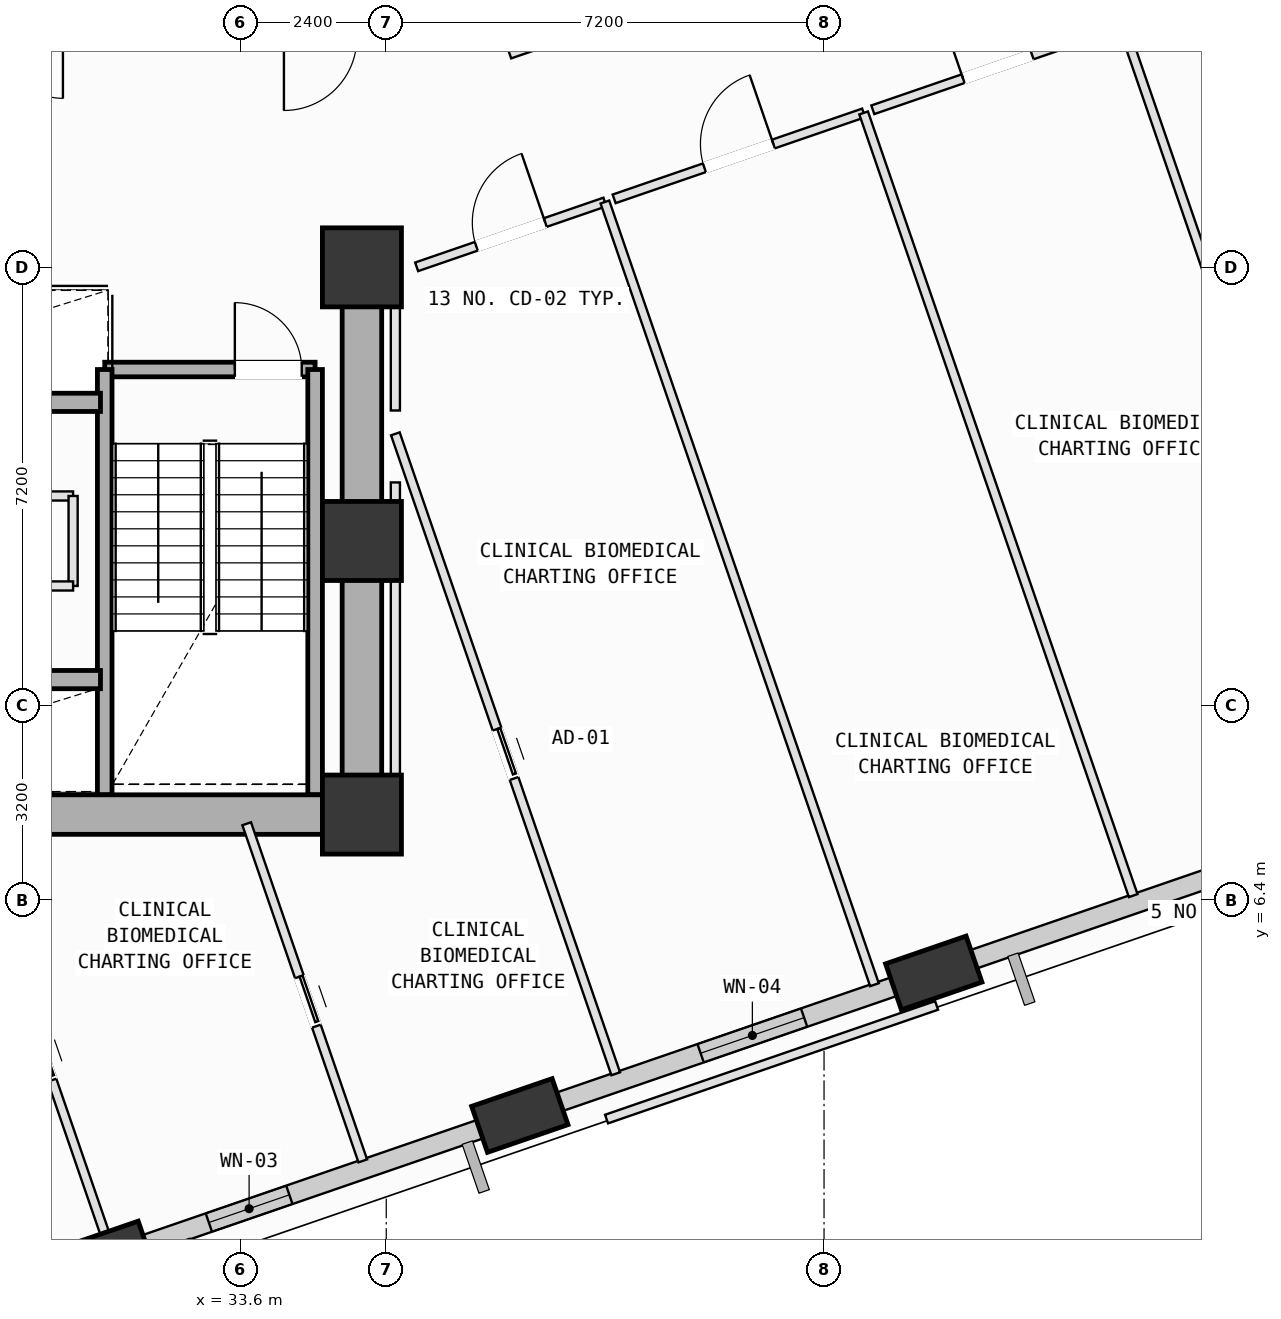
"""IFC4 building model, lengths in metres.
Left out: names, types, materials, properties, quantities, classifications, styles, units other than length and angle.
Written with IfcOpenShell. Run it as: python <this file> out.ifc"""

import sys

from ifc_helpers import new_model, si_unit, direction, frame, frame_2d, origin, origin_2d, place, context, subcontext, project, spatial, rectangle, extrude, element, fill, save


model = new_model("IFC4")
c1 = context("Model", 3, precision=1e-05, world=origin(), true_north=direction((0.0, 1.0)))
c2 = subcontext(c1, "Body", "Model", "MODEL_VIEW")
j1 = project(units=[si_unit("LENGTHUNIT", "METRE"), si_unit("PLANEANGLEUNIT", "RADIAN")], contexts=[c1])
p1 = place(None, origin())
s1 = spatial("IfcSite", under=j1, at=p1, CompositionType="ELEMENT")
p2 = place(p1, origin())
s2 = spatial("IfcBuilding", under=s1, at=p2, CompositionType="ELEMENT")
p3 = place(p2, frame((0.0, 0.0, 104.4)))
s3 = spatial("IfcBuildingStorey", under=s2, at=p3, CompositionType="ELEMENT", Elevation=104.4)
for number, where, z_axis, x_axis in (
    (1, (35.6, 7.8, 0.0), (0.0, 0.0, 1.0), (1.0, 0.0, 0.0)),
    (2, (35.6, 12.3, 0.0), (0.0, 0.0, 1.0), (1.0, 0.0, 0.0)),
    (3, (35.6, 16.8, 0.0), (0.0, 0.0, 1.0), (1.0, 0.0, 0.0)),
):
    element("IfcColumn", number, at=place(p3, frame(where, z_axis=z_axis, x_axis=x_axis)), inside=s3, PredefinedType="COLUMN", context=c2, shape_type="SweptSolid", body=[
        extrude(rectangle(XDim=1.3, YDim=1.3, at=origin_2d()), origin(), (0.0, 0.0, 1.0), 4.0),
    ])
p4 = place(p3, frame((31.389, 0.507, 0.002), z_axis=(0.100228414923, -0.008327042356, 0.994929608167), x_axis=(-0.244520655931, 0.969091071717, 0.032743603058)))
e4 = element("IfcColumn", 4, at=p4, inside=s3, PredefinedType="COLUMN", context=c2, shape_type="SweptSolid", body=[
    extrude(rectangle(XDim=1.4, YDim=0.8, at=origin_2d()), origin(), (0.0, 0.0, 1.0), 4.017),
])
p5 = place(p3, frame((38.197, 2.851, 0.002), z_axis=(0.090452237625, 0.019769318916, 0.995704557958), x_axis=(-0.518581513534, 0.854496683427, 0.030143520588)))
e5 = element("IfcColumn", 5, at=p5, inside=s3, PredefinedType="COLUMN", context=c2, shape_type="SweptSolid", body=[
    extrude(rectangle(XDim=1.4, YDim=0.8, at=origin_2d()), origin(), (0.0, 0.0, 1.0), 4.014),
])
p6 = place(p3, frame((45.004, 5.195, 0.002), z_axis=(0.080468927595, 0.047746113501, 0.995612906876), x_axis=(-0.761244761344, 0.647748745113, 0.030462707212)))
e6 = element("IfcColumn", 6, at=p6, inside=s3, PredefinedType="COLUMN", context=c2, shape_type="SweptSolid", body=[
    extrude(rectangle(XDim=1.4, YDim=0.8, at=origin_2d()), origin(), (0.0, 0.0, 1.0), 4.014),
])
p7 = place(p3, frame((37.902, 2.749, 0.0), z_axis=(0.0, 0.0, 1.0), x_axis=(-0.945529854609, -0.32553539599, 0.0)))
e7 = element("IfcWall", 7, at=p7, inside=s3, PredefinedType="SOLIDWALL", context=c2, shape_type="SweptSolid", body=[
    extrude(rectangle(XDim=6.214, YDim=0.32, at=frame_2d((3.107, 0.0))), origin(), (0.0, 0.0, 1.0), 3.165),
])
p8 = place(p7, frame((3.698, 0.0, 0.75)))
e8 = element("IfcOpeningElement", 8, at=p8, cuts=e7, PredefinedType="OPENING", context=c2, shape_type="SweptSolid", body=[
    extrude(rectangle(XDim=1.4, YDim=1.85, at=frame_2d((0.7, 0.925))), frame((0.0, 0.17, 0.0), z_axis=(0.0, -1.0, 0.0), x_axis=(1.0, 0.0, 0.0)), (0.0, 0.0, 1.0), 0.34),
])
p9 = place(p3, frame((44.71, 5.094, 0.0), z_axis=(0.0, 0.0, 1.0), x_axis=(-0.945514965925, -0.325578637522, 0.0)))
e9 = element("IfcWall", 9, at=p9, inside=s3, PredefinedType="SOLIDWALL", context=c2, shape_type="SweptSolid", body=[
    extrude(rectangle(XDim=6.209, YDim=0.32, at=frame_2d((3.104, 0.0))), origin(), (0.0, 0.0, 1.0), 3.165),
])
p10 = place(p9, frame((1.944, 0.0, 0.75)))
e10 = element("IfcOpeningElement", 10, at=p10, cuts=e9, PredefinedType="OPENING", context=c2, shape_type="SweptSolid", body=[
    extrude(rectangle(XDim=1.8, YDim=2.05, at=frame_2d((0.9, 1.025))), frame((0.0, 0.17, 0.0), z_axis=(0.0, -1.0, 0.0), x_axis=(1.0, 0.0, 0.0)), (0.0, 0.0, 1.0), 0.34),
])
p11 = place(p3, frame((51.525, 7.44, 0.0), z_axis=(0.0, 0.0, 1.0), x_axis=(-0.945519755004, -0.325564729196, 0.0)))
e11 = element("IfcWall", 11, at=p11, inside=s3, PredefinedType="SOLIDWALL", context=c2, shape_type="SweptSolid", body=[
    extrude(rectangle(XDim=6.218, YDim=0.32, at=frame_2d((3.109, 0.0))), origin(), (0.0, 0.0, 1.0), 3.165),
])
p12 = place(p11, frame((0.908, 0.0, 0.75)))
e12 = element("IfcOpeningElement", 12, at=p12, cuts=e11, PredefinedType="OPENING", context=c2, shape_type="SweptSolid", body=[
    extrude(rectangle(XDim=1.2, YDim=1.75, at=frame_2d((0.6, 0.875))), frame((0.0, 0.17, 0.0), z_axis=(0.0, -1.0, 0.0), x_axis=(1.0, 0.0, 0.0)), (0.0, 0.0, 1.0), 0.34),
])
p13 = place(p3, frame((31.37, 15.12, 0.0), z_axis=(0.0, 0.0, 1.0), x_axis=(1.0, 0.0, 0.0)))
e13 = element("IfcWall", 13, at=p13, inside=s3, PredefinedType="SOLIDWALL", context=c2, shape_type="SweptSolid", body=[
    extrude(rectangle(XDim=3.46, YDim=0.24, at=frame_2d((1.73, 0.0))), origin(), (0.0, 0.0, 1.0), 3.78),
])
p14 = place(p13, frame((2.14, 0.0, 0.0)))
e14 = element("IfcOpeningElement", 14, at=p14, cuts=e13, PredefinedType="OPENING", context=c2, shape_type="SweptSolid", body=[
    extrude(rectangle(XDim=1.1, YDim=2.15, at=frame_2d((0.55, 1.075))), frame((0.0, 0.13, 0.0), z_axis=(0.0, -1.0, 0.0), x_axis=(1.0, 0.0, 0.0)), (0.0, 0.0, 1.0), 0.26),
])
for number, where, z_axis, x_axis in (
    (15, (34.83, 15.12, 0.0), (0.0, 0.0, 1.0), (0.0, -1.0, 0.0)),
    (16, (31.37, 8.125, 0.0), (0.0, 0.0, 1.0), (0.0, 1.0, 0.0)),
):
    element("IfcWall", number, at=place(p3, frame(where, z_axis=z_axis, x_axis=x_axis)), inside=s3, PredefinedType="SOLIDWALL", context=c2, shape_type="SweptSolid", body=[
        extrude(rectangle(XDim=6.995, YDim=0.24, at=frame_2d((3.498, 0.0))), origin(), (0.0, 0.0, 1.0), 3.78),
    ])
p15 = place(p3, frame((24.8, 7.8, 0.0), z_axis=(0.0, 0.0, 1.0), x_axis=(1.0, 0.0, 0.0)))
e17 = element("IfcWall", 17, at=p15, inside=s3, PredefinedType="SHEAR", context=c2, shape_type="SweptSolid", body=[
    extrude(rectangle(XDim=10.8, YDim=0.65, at=frame_2d((5.4, 0.0))), origin(), (0.0, 0.0, 1.0), 3.78),
])
p16 = place(p3, frame((35.6, 7.8, 0.0), z_axis=(0.0, 0.0, 1.0), x_axis=(0.0, 1.0, 0.0)))
e18 = element("IfcWall", 18, at=p16, inside=s3, PredefinedType="SHEAR", context=c2, shape_type="SweptSolid", body=[
    extrude(rectangle(XDim=9.0, YDim=0.65, at=frame_2d((4.5, 0.0))), origin(), (0.0, 0.0, 1.0), 3.78),
])
p17 = place(p3, frame((25.85, 10.02, 0.0), z_axis=(0.0, 0.0, 1.0), x_axis=(1.0, 0.0, 0.0)))
e19 = element("IfcWall", 19, at=p17, inside=s3, PredefinedType="SOLIDWALL", context=c2, shape_type="SweptSolid", body=[
    extrude(rectangle(XDim=5.45, YDim=0.3, at=frame_2d((2.725, 0.0))), origin(), (0.0, 0.0, 1.0), 3.78),
])
p18 = place(p17, frame((0.34, 0.0, 0.0)))
e20 = element("IfcOpeningElement", 20, at=p18, cuts=e19, PredefinedType="OPENING", context=c2, shape_type="SweptSolid", body=[
    extrude(rectangle(XDim=1.12, YDim=2.15, at=frame_2d((0.56, 1.075))), frame((0.0, 0.16, 0.0), z_axis=(0.0, -1.0, 0.0), x_axis=(1.0, 0.0, 0.0)), (0.0, 0.0, 1.0), 0.32),
])
p19 = place(p17, frame((2.24, 0.0, 0.0)))
e21 = element("IfcOpeningElement", 21, at=p19, cuts=e19, PredefinedType="OPENING", context=c2, shape_type="SweptSolid", body=[
    extrude(rectangle(XDim=1.12, YDim=2.15, at=frame_2d((0.56, 1.075))), frame((0.0, 0.16, 0.0), z_axis=(0.0, -1.0, 0.0), x_axis=(1.0, 0.0, 0.0)), (0.0, 0.0, 1.0), 0.32),
])
p20 = place(p3, frame((25.85, 14.58, 0.0), z_axis=(0.0, 0.0, 1.0), x_axis=(1.0, 0.0, 0.0)))
e22 = element("IfcWall", 22, at=p20, inside=s3, PredefinedType="SOLIDWALL", context=c2, shape_type="SweptSolid", body=[
    extrude(rectangle(XDim=5.45, YDim=0.3, at=frame_2d((2.725, 0.0))), origin(), (0.0, 0.0, 1.0), 3.78),
])
p21 = place(p3, frame((26.45, 13.04, 0.0), z_axis=(0.0, 0.0, 1.0), x_axis=(1.0, 0.0, 0.0)))
e23 = element("IfcWall", 23, at=p21, inside=s3, PredefinedType="PARTITIONING", context=c2, shape_type="SweptSolid", body=[
    extrude(rectangle(XDim=4.4, YDim=0.15, at=frame_2d((2.2, 0.0))), origin(), (0.0, 0.0, 1.0), 3.78),
])
p22 = place(p21, frame((1.74, 0.0, 0.0)))
e24 = element("IfcOpeningElement", 24, at=p22, cuts=e23, PredefinedType="OPENING", context=c2, shape_type="SweptSolid", body=[
    extrude(rectangle(XDim=0.92, YDim=2.1, at=frame_2d((0.46, 1.05))), frame((0.0, 0.085, 0.0), z_axis=(0.0, -1.0, 0.0), x_axis=(1.0, 0.0, 0.0)), (0.0, 0.0, 1.0), 0.17),
])
p23 = place(p3, frame((30.85, 13.04, 0.0), z_axis=(0.0, 0.0, 1.0), x_axis=(0.0, -1.0, 0.0)))
e25 = element("IfcWall", 25, at=p23, inside=s3, PredefinedType="PARTITIONING", context=c2, shape_type="SweptSolid", body=[
    extrude(rectangle(XDim=1.48, YDim=0.15, at=frame_2d((0.74, 0.0))), origin(), (0.0, 0.0, 1.0), 3.78),
])
p24 = place(p3, frame((30.85, 11.56, 0.0), z_axis=(0.0, 0.0, 1.0), x_axis=(-1.0, 0.0, 0.0)))
e26 = element("IfcWall", 26, at=p24, inside=s3, PredefinedType="PARTITIONING", context=c2, shape_type="SweptSolid", body=[
    extrude(rectangle(XDim=4.4, YDim=0.15, at=frame_2d((2.2, 0.0))), origin(), (0.0, 0.0, 1.0), 3.78),
])
p25 = place(p3, frame((29.051, 7.649, 0.0), z_axis=(0.0, 0.0, 1.0), x_axis=(0.325547594616, -0.94552565467, 0.0)))
e27 = element("IfcWall", 27, at=p25, inside=s3, PredefinedType="PARTITIONING", context=c2, shape_type="SweptSolid", body=[
    extrude(rectangle(XDim=7.744, YDim=0.15, at=frame_2d((3.872, 0.0))), origin(), (0.0, 0.0, 1.0), 3.78),
])
p26 = place(p25, frame((3.601, 0.0, 0.0)))
e28 = element("IfcOpeningElement", 28, at=p26, cuts=e27, PredefinedType="OPENING", context=c2, shape_type="SweptSolid", body=[
    extrude(rectangle(XDim=0.86, YDim=2.06, at=frame_2d((0.43, 1.03))), frame((0.0, 0.085, 0.0), z_axis=(0.0, -1.0, 0.0), x_axis=(1.0, 0.0, 0.0)), (0.0, 0.0, 1.0), 0.17),
])
p27 = place(p3, frame((33.705, 7.649, 0.0), z_axis=(0.0, 0.0, 1.0), x_axis=(0.32551721058, -0.945536115448, 0.0)))
e29 = element("IfcWall", 29, at=p27, inside=s3, PredefinedType="PARTITIONING", context=c2, shape_type="SweptSolid", body=[
    extrude(rectangle(XDim=5.864, YDim=0.15, at=frame_2d((2.932, 0.0))), origin(), (0.0, 0.0, 1.0), 3.78),
])
p28 = place(p27, frame((2.661, 0.0, 0.0)))
e30 = element("IfcOpeningElement", 30, at=p28, cuts=e29, PredefinedType="OPENING", context=c2, shape_type="SweptSolid", body=[
    extrude(rectangle(XDim=0.86, YDim=2.06, at=frame_2d((0.43, 1.03))), frame((0.0, 0.085, 0.0), z_axis=(0.0, -1.0, 0.0), x_axis=(1.0, 0.0, 0.0)), (0.0, 0.0, 1.0), 0.17),
])
p29 = place(p3, frame((36.15, 14.062, 0.0), z_axis=(0.0, 0.0, 1.0), x_axis=(0.325568871933, -0.945518328552, 0.0)))
e31 = element("IfcWall", 31, at=p29, inside=s3, PredefinedType="PARTITIONING", context=c2, shape_type="SweptSolid", body=[
    extrude(rectangle(XDim=11.131, YDim=0.15, at=frame_2d((5.566, 0.0))), origin(), (0.0, 0.0, 1.0), 3.78),
])
p30 = place(p29, frame((5.136, 0.0, 0.0)))
e32 = element("IfcOpeningElement", 32, at=p30, cuts=e31, PredefinedType="OPENING", context=c2, shape_type="SweptSolid", body=[
    extrude(rectangle(XDim=0.86, YDim=2.06, at=frame_2d((0.43, 1.03))), frame((0.0, 0.085, 0.0), z_axis=(0.0, -1.0, 0.0), x_axis=(1.0, 0.0, 0.0)), (0.0, 0.0, 1.0), 0.17),
])
p31 = place(p3, frame((38.915, 2.855, 0.0), z_axis=(0.0, 0.0, 1.0), x_axis=(-0.945511506532, -0.325588683795, 0.0)))
e33 = element("IfcWall", 33, at=p31, inside=s3, PredefinedType="PARTITIONING", context=c2, shape_type="SweptSolid", body=[
    extrude(rectangle(XDim=0.992, YDim=0.15, at=frame_2d((0.496, 0.0))), origin(), (0.0, 0.0, 1.0), 3.165),
])
p32 = place(p3, frame((35.6, 7.5, 0.0), z_axis=(0.0, 0.0, 1.0), x_axis=(1.0, 0.0, 0.0)))
e34 = element("IfcWall", 34, at=p32, inside=s3, PredefinedType="PARTITIONING", context=c2, shape_type="SweptSolid", body=[
    extrude(rectangle(XDim=0.55, YDim=0.15, at=frame_2d((0.275, 0.0))), origin(), (0.0, 0.0, 1.0), 2.965),
])
p33 = place(p3, frame((36.15, 7.5, 0.0), z_axis=(0.0, 0.0, 1.0), x_axis=(0.0, 1.0, 0.0)))
e35 = element("IfcWall", 35, at=p33, inside=s3, PredefinedType="PARTITIONING", context=c2, shape_type="SweptSolid", body=[
    extrude(rectangle(XDim=5.763, YDim=0.15, at=frame_2d((2.881, 0.0))), origin(), (0.0, 0.0, 1.0), 3.78),
])
p34 = place(p3, frame((36.5, 16.809, 0.0), z_axis=(0.0, 0.0, 1.0), x_axis=(0.945528180051, 0.325540259767, 0.0)))
e36 = element("IfcWall", 36, at=p34, inside=s3, PredefinedType="PARTITIONING", context=c2, shape_type="SweptSolid", body=[
    extrude(rectangle(XDim=3.274, YDim=0.15, at=frame_2d((1.637, 0.0))), origin(), (0.0, 0.0, 1.0), 2.965),
])
p35 = place(p34, frame((1.037, 0.0, 0.0)))
e37 = element("IfcOpeningElement", 37, at=p35, cuts=e36, PredefinedType="OPENING", context=c2, shape_type="SweptSolid", body=[
    extrude(rectangle(XDim=1.2, YDim=2.15, at=frame_2d((0.6, 1.075))), frame((0.0, 0.085, 0.0), z_axis=(0.0, -1.0, 0.0), x_axis=(1.0, 0.0, 0.0)), (0.0, 0.0, 1.0), 0.17),
])
p36 = place(p3, frame((39.596, 17.875, 0.0), z_axis=(0.0, 0.0, 1.0), x_axis=(0.325604923225, -0.945505914298, 0.0)))
e38 = element("IfcWall", 38, at=p36, inside=s3, PredefinedType="PARTITIONING", context=c2, shape_type="SweptSolid", body=[
    extrude(rectangle(XDim=13.615, YDim=0.15, at=frame_2d((6.808, 0.0))), origin(), (0.0, 0.0, 1.0), 3.78),
])
p37 = place(p3, frame((36.15, 14.446, 0.0), z_axis=(0.0, 0.0, 1.0), x_axis=(0.0, 1.0, 0.0)))
e39 = element("IfcWall", 39, at=p37, inside=s3, PredefinedType="PARTITIONING", context=c2, shape_type="SweptSolid", body=[
    extrude(rectangle(XDim=2.054, YDim=0.15, at=frame_2d((1.027, 0.0))), origin(), (0.0, 0.0, 1.0), 3.78),
])
p38 = place(p3, frame((39.748, 17.927, 0.0), z_axis=(0.0, 0.0, 1.0), x_axis=(0.945497269667, 0.325630024802, 0.0)))
e40 = element("IfcWall", 40, at=p38, inside=s3, PredefinedType="PARTITIONING", context=c2, shape_type="SweptSolid", body=[
    extrude(rectangle(XDim=4.34, YDim=0.15, at=frame_2d((2.17, 0.0))), origin(), (0.0, 0.0, 1.0), 2.965),
])
p39 = place(p38, frame((1.57, 0.0, 0.0)))
e41 = element("IfcOpeningElement", 41, at=p39, cuts=e40, PredefinedType="OPENING", context=c2, shape_type="SweptSolid", body=[
    extrude(rectangle(XDim=1.2, YDim=2.15, at=frame_2d((0.6, 1.075))), frame((0.0, 0.085, 0.0), z_axis=(0.0, -1.0, 0.0), x_axis=(1.0, 0.0, 0.0)), (0.0, 0.0, 1.0), 0.17),
])
p40 = place(p3, frame((43.851, 19.34, 0.0), z_axis=(0.0, 0.0, 1.0), x_axis=(0.325588892423, -0.945511434691, 0.0)))
e42 = element("IfcWall", 42, at=p40, inside=s3, PredefinedType="PARTITIONING", context=c2, shape_type="SweptSolid", body=[
    extrude(rectangle(XDim=13.615, YDim=0.15, at=frame_2d((6.808, 0.0))), origin(), (0.0, 0.0, 1.0), 3.78),
])
p41 = place(p3, frame((45.721, 5.199, 0.0), z_axis=(0.0, 0.0, 1.0), x_axis=(-0.945302214861, -0.326195834705, 0.0)))
e43 = element("IfcWall", 43, at=p41, inside=s3, PredefinedType="PARTITIONING", context=c2, shape_type="SweptSolid", body=[
    extrude(rectangle(XDim=0.99, YDim=0.15, at=frame_2d((0.495, 0.0))), origin(), (0.0, 0.0, 1.0), 3.165),
])
p42 = place(p3, frame((44.002, 19.392, 0.0), z_axis=(0.0, 0.0, 1.0), x_axis=(0.945538437295, 0.325510466188, 0.0)))
e44 = element("IfcWall", 44, at=p42, inside=s3, PredefinedType="PARTITIONING", context=c2, shape_type="SweptSolid", body=[
    extrude(rectangle(XDim=4.34, YDim=0.15, at=frame_2d((2.17, 0.0))), origin(), (0.0, 0.0, 1.0), 3.78),
])
p43 = place(p42, frame((1.57, 0.0, 0.0)))
e45 = element("IfcOpeningElement", 45, at=p43, cuts=e44, PredefinedType="OPENING", context=c2, shape_type="SweptSolid", body=[
    extrude(rectangle(XDim=1.2, YDim=2.15, at=frame_2d((0.6, 1.075))), frame((0.0, 0.085, 0.0), z_axis=(0.0, -1.0, 0.0), x_axis=(1.0, 0.0, 0.0)), (0.0, 0.0, 1.0), 0.17),
])
p44 = place(p3, frame((48.106, 20.805, 0.0), z_axis=(0.0, 0.0, 1.0), x_axis=(0.325540798332, -0.945527994626, 0.0)))
e46 = element("IfcWall", 46, at=p44, inside=s3, PredefinedType="PARTITIONING", context=c2, shape_type="SweptSolid", body=[
    extrude(rectangle(XDim=13.615, YDim=0.15, at=frame_2d((6.807, 0.0))), origin(), (0.0, 0.0, 1.0), 3.78),
])
p45 = place(p3, frame((39.107, 20.678, 0.0), z_axis=(0.0, 0.0, 1.0), x_axis=(-0.945771021348, -0.324834073304, 0.0)))
e47 = element("IfcWall", 47, at=p45, inside=s3, PredefinedType="PARTITIONING", context=c2, shape_type="SweptSolid", body=[
    extrude(rectangle(XDim=1.139, YDim=0.15, at=frame_2d((0.569, 0.0))), origin(), (0.0, 0.0, 1.0), 3.78),
])
p46 = place(p3, frame((45.051, 4.661, 0.0), z_axis=(0.0, 0.0, 1.0), x_axis=(-0.945524281037, -0.325551584192, 0.0)))
e48 = element("IfcWall", 48, at=p46, inside=s3, PredefinedType="PARTITIONING", context=c2, shape_type="SweptSolid", body=[
    extrude(rectangle(XDim=5.741, YDim=0.15, at=frame_2d((2.87, 0.0))), origin(), (0.0, 0.0, 1.0), 3.78),
])
p47 = place(p8, origin())
e49 = element("IfcWindow", 49, at=p47, inside=s3, PartitioningType="SINGLE_PANEL", PredefinedType="WINDOW", context=c2, shape_type="SweptSolid", body=[
    extrude(rectangle(XDim=1.4, YDim=1.85, at=frame_2d((0.7, 0.925))), frame((0.0, 0.03, 0.0), z_axis=(0.0, -1.0, 0.0), x_axis=(1.0, 0.0, 0.0)), (0.0, 0.0, 1.0), 0.06),
])
fill(e8, e49)
p48 = place(p10, origin())
e50 = element("IfcWindow", 50, at=p48, inside=s3, PartitioningType="SINGLE_PANEL", PredefinedType="WINDOW", context=c2, shape_type="SweptSolid", body=[
    extrude(rectangle(XDim=1.8, YDim=2.05, at=frame_2d((0.9, 1.025))), frame((0.0, 0.03, 0.0), z_axis=(0.0, -1.0, 0.0), x_axis=(1.0, 0.0, 0.0)), (0.0, 0.0, 1.0), 0.06),
])
fill(e10, e50)
p49 = place(p14, origin())
e51 = element("IfcDoor", 51, at=p49, inside=s3, OperationType="SINGLE_SWING_LEFT", PredefinedType="DOOR", context=c2, shape_type="SweptSolid", body=[
    extrude(rectangle(XDim=1.1, YDim=2.15, at=frame_2d((0.55, 1.075))), frame((0.0, 0.025, 0.0), z_axis=(0.0, -1.0, 0.0), x_axis=(1.0, 0.0, 0.0)), (0.0, 0.0, 1.0), 0.05),
])
fill(e14, e51)
p50 = place(p35, origin())
e52 = element("IfcDoor", 52, at=p50, inside=s3, OperationType="SINGLE_SWING_RIGHT", PredefinedType="DOOR", context=c2, shape_type="SweptSolid", body=[
    extrude(rectangle(XDim=1.2, YDim=2.15, at=frame_2d((0.6, 1.075))), frame((0.0, 0.025, 0.0), z_axis=(0.0, -1.0, 0.0), x_axis=(1.0, 0.0, 0.0)), (0.0, 0.0, 1.0), 0.05),
])
fill(e37, e52)
p51 = place(p39, origin())
e53 = element("IfcDoor", 53, at=p51, inside=s3, OperationType="SINGLE_SWING_RIGHT", PredefinedType="DOOR", context=c2, shape_type="SweptSolid", body=[
    extrude(rectangle(XDim=1.2, YDim=2.15, at=frame_2d((0.6, 1.075))), frame((0.0, 0.025, 0.0), z_axis=(0.0, -1.0, 0.0), x_axis=(1.0, 0.0, 0.0)), (0.0, 0.0, 1.0), 0.05),
])
fill(e41, e53)
p52 = place(p43, origin())
e54 = element("IfcDoor", 54, at=p52, inside=s3, OperationType="SINGLE_SWING_LEFT", PredefinedType="DOOR", context=c2, shape_type="SweptSolid", body=[
    extrude(rectangle(XDim=1.2, YDim=2.15, at=frame_2d((0.6, 1.075))), frame((0.0, 0.025, 0.0), z_axis=(0.0, -1.0, 0.0), x_axis=(1.0, 0.0, 0.0)), (0.0, 0.0, 1.0), 0.05),
])
fill(e45, e54)
p53 = place(p30, origin())
e55 = element("IfcDoor", 55, at=p53, inside=s3, OperationType="SLIDING_TO_LEFT", PredefinedType="DOOR", context=c2, shape_type="SweptSolid", body=[
    extrude(rectangle(XDim=0.86, YDim=2.06, at=frame_2d((0.43, 1.03))), frame((0.0, 0.025, 0.0), z_axis=(0.0, -1.0, 0.0), x_axis=(1.0, 0.0, 0.0)), (0.0, 0.0, 1.0), 0.05),
])
fill(e32, e55)
p54 = place(p28, origin())
e56 = element("IfcDoor", 56, at=p54, inside=s3, OperationType="SLIDING_TO_LEFT", PredefinedType="DOOR", context=c2, shape_type="SweptSolid", body=[
    extrude(rectangle(XDim=0.86, YDim=2.06, at=frame_2d((0.43, 1.03))), frame((0.0, 0.025, 0.0), z_axis=(0.0, -1.0, 0.0), x_axis=(1.0, 0.0, 0.0)), (0.0, 0.0, 1.0), 0.05),
])
fill(e30, e56)
p55 = place(p26, origin())
e57 = element("IfcDoor", 57, at=p55, inside=s3, OperationType="SLIDING_TO_LEFT", PredefinedType="DOOR", context=c2, shape_type="SweptSolid", body=[
    extrude(rectangle(XDim=0.86, YDim=2.06, at=frame_2d((0.43, 1.03))), frame((0.0, 0.025, 0.0), z_axis=(0.0, -1.0, 0.0), x_axis=(1.0, 0.0, 0.0)), (0.0, 0.0, 1.0), 0.05),
])
fill(e28, e57)
save(model, sys.argv[1])
